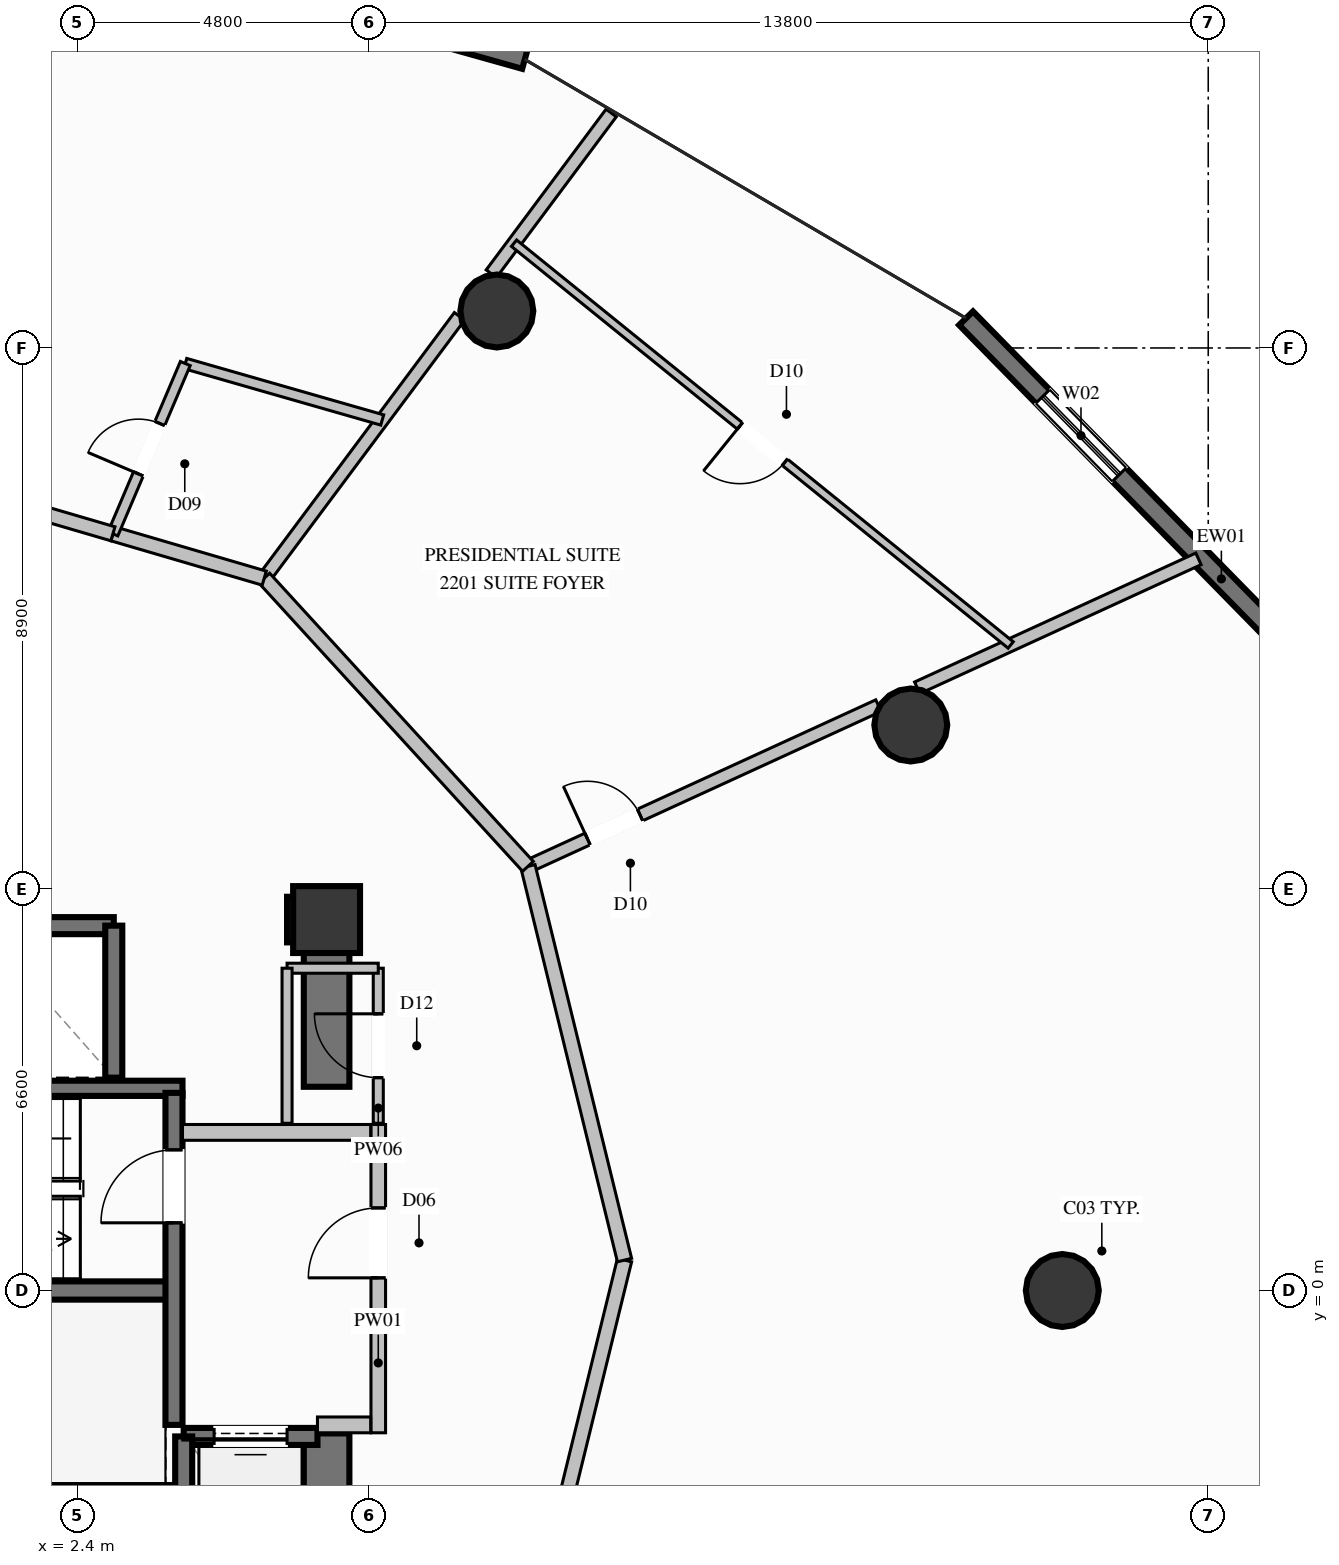
"""IFC4 building model, lengths in metres.
Left out: names, types, materials, properties, quantities, classifications, styles, units other than length and angle.
Written with IfcOpenShell. Run it as: python <this file> out.ifc"""

import sys

from ifc_helpers import new_model, si_unit, direction, frame, frame_2d, origin, origin_2d, place, context, subcontext, project, spatial, rectangle, circle, extrude, element, fill, save


model = new_model("IFC4")
c1 = context("Model", 3, precision=1e-05, world=origin(), true_north=direction((0.0, 1.0)))
c2 = subcontext(c1, "Body", "Model", "MODEL_VIEW")
j1 = project(units=[si_unit("LENGTHUNIT", "METRE"), si_unit("PLANEANGLEUNIT", "RADIAN")], contexts=[c1])
p1 = place(None, origin())
s1 = spatial("IfcSite", under=j1, at=p1, CompositionType="ELEMENT")
p2 = place(p1, origin())
s2 = spatial("IfcBuilding", under=s1, at=p2, CompositionType="ELEMENT")
p3 = place(p2, frame((0.0, 0.0, 82.4)))
s3 = spatial("IfcBuildingStorey", under=s2, at=p3, CompositionType="ELEMENT", Elevation=82.4)
p4 = place(p3, frame((6.5, 6.1, 0.0), z_axis=(0.0, 0.0, 1.0), x_axis=(1.0, 0.0, 0.0)))
e1 = element("IfcColumn", 1, at=p4, inside=s3, PredefinedType="COLUMN", context=c2, shape_type="SweptSolid", body=[
    extrude(rectangle(XDim=1.1, YDim=1.1, at=origin_2d()), origin(), (0.0, 0.0, 1.0), 3.6),
])
p5 = place(p3, frame((-3.99, 0.0, 0.0), z_axis=(0.0, 0.0, 1.0), x_axis=(1.0, 0.0, 0.0)))
e2 = element("IfcWall", 2, at=p5, inside=s3, PredefinedType="SHEAR", context=c2, shape_type="SweptSolid", body=[
    extrude(rectangle(XDim=7.98, YDim=0.3, at=frame_2d((3.99, 0.0))), origin(), (0.0, 0.0, 1.0), 3.6),
])
for number, where, z_axis, x_axis in (
    (3, (-4.13, -3.325, 0.0), (0.0, 0.0, 1.0), (1.0, 0.0, 0.0)),
    (4, (-4.13, 3.325, 0.0), (0.0, 0.0, 1.0), (1.0, 0.0, 0.0)),
):
    element("IfcWall", number, at=place(p3, frame(where, z_axis=z_axis, x_axis=x_axis)), inside=s3, PredefinedType="SOLIDWALL", context=c2, shape_type="SweptSolid", body=[
        extrude(rectangle(XDim=8.26, YDim=0.25, at=frame_2d((4.13, 0.0))), origin(), (0.0, 0.0, 1.0), 3.6),
    ])
p6 = place(p3, frame((5.85, 6.1, 0.0), z_axis=(0.0, 0.0, 1.0), x_axis=(1.0, 0.0, 0.0)))
e5 = element("IfcWall", 5, at=p6, inside=s3, PredefinedType="SHEAR", context=c2, shape_type="SweptSolid", body=[
    extrude(rectangle(XDim=0.275, YDim=0.75, at=frame_2d((0.137, 0.0))), origin(), (0.0, 0.0, 1.0), 3.6),
])
p7 = place(p3, frame((6.5, -6.475, 0.0), z_axis=(0.0, 0.0, 1.0), x_axis=(0.0, 1.0, 0.0)))
e6 = element("IfcWall", 6, at=p7, inside=s3, PredefinedType="SHEAR", context=c2, shape_type="SweptSolid", body=[
    extrude(rectangle(XDim=4.125, YDim=0.75, at=frame_2d((2.062, 0.0))), origin(), (0.0, 0.0, 1.0), 3.6),
])
p8 = place(p3, frame((6.5, 3.35, 0.0), z_axis=(0.0, 0.0, 1.0), x_axis=(0.0, 1.0, 0.0)))
e7 = element("IfcWall", 7, at=p8, inside=s3, PredefinedType="SHEAR", context=c2, shape_type="SweptSolid", body=[
    extrude(rectangle(XDim=3.125, YDim=0.75, at=frame_2d((1.562, 0.0))), origin(), (0.0, 0.0, 1.0), 3.6),
])
for number, where, z_axis, x_axis in (
    (8, (18.6, 0.0, 0.0), (0.0, 0.0, 1.0), (1.0, 0.0, 0.0)),
    (9, (16.108, 9.3, 0.0), (0.0, 0.0, 1.0), (1.0, 0.0, 0.0)),
    (10, (9.3, 16.108, 0.0), (0.0, 0.0, 1.0), (1.0, 0.0, 0.0)),
):
    element("IfcColumn", number, at=place(p3, frame(where, z_axis=z_axis, x_axis=x_axis)), inside=s3, PredefinedType="COLUMN", context=c2, shape_type="SweptSolid", body=[
        extrude(circle(Radius=0.6, at=origin_2d()), origin(), (0.0, 0.0, 1.0), 3.6),
    ])
p9 = place(p3, frame((17.017, 15.989, 0.0), z_axis=(0.0, 0.0, 1.0), x_axis=(0.699759555634, -0.714378446132, 0.0)))
e11 = element("IfcWall", 11, at=p9, inside=s3, PredefinedType="SOLIDWALL", context=c2, shape_type="SweptSolid", body=[
    extrude(rectangle(XDim=8.15, YDim=0.32, at=frame_2d((4.075, 0.0))), origin(), (0.0, 0.0, 1.0), 3.34),
])
p10 = place(p9, frame((1.801, 0.0, 0.35)))
e12 = element("IfcOpeningElement", 12, at=p10, cuts=e11, PredefinedType="OPENING", context=c2, shape_type="SweptSolid", body=[
    extrude(rectangle(XDim=1.8, YDim=2.6, at=frame_2d((0.9, 1.3))), frame((0.0, 0.17, 0.0), z_axis=(0.0, -1.0, 0.0), x_axis=(1.0, 0.0, 0.0)), (0.0, 0.0, 1.0), 0.34),
])
p11 = place(p3, frame((1.661, 22.52, 0.0), z_axis=(0.0, 0.0, 1.0), x_axis=(0.962743068747, -0.270417794495, 0.0)))
e13 = element("IfcWall", 13, at=p11, inside=s3, PredefinedType="SOLIDWALL", context=c2, shape_type="SweptSolid", body=[
    extrude(rectangle(XDim=8.413, YDim=0.32, at=frame_2d((4.206, 0.0))), origin(), (0.0, 0.0, 1.0), 3.34),
])
p12 = place(p11, frame((3.306, 0.0, 0.35)))
e14 = element("IfcOpeningElement", 14, at=p12, cuts=e13, PredefinedType="OPENING", context=c2, shape_type="SweptSolid", body=[
    extrude(rectangle(XDim=1.8, YDim=2.6, at=frame_2d((0.9, 1.3))), frame((0.0, 0.17, 0.0), z_axis=(0.0, -1.0, 0.0), x_axis=(1.0, 0.0, 0.0)), (0.0, 0.0, 1.0), 0.34),
])
p13 = place(p3, frame((3.0, 6.0, 0.0), z_axis=(0.0, 0.0, 1.0), x_axis=(-1.0, 0.0, 0.0)))
e15 = element("IfcWall", 15, at=p13, inside=s3, PredefinedType="SOLIDWALL", context=c2, shape_type="SweptSolid", body=[
    extrude(rectangle(XDim=2.2, YDim=0.28, at=frame_2d((1.1, 0.0))), origin(), (0.0, 0.0, 1.0), 3.34),
])
p14 = place(p3, frame((3.0, 3.5, 0.0), z_axis=(0.0, 0.0, 1.0), x_axis=(0.0, 1.0, 0.0)))
e16 = element("IfcWall", 16, at=p14, inside=s3, PredefinedType="SOLIDWALL", context=c2, shape_type="SweptSolid", body=[
    extrude(rectangle(XDim=2.5, YDim=0.28, at=frame_2d((1.25, 0.0))), origin(), (0.0, 0.0, 1.0), 3.34),
])
p15 = place(p3, frame((6.35, -2.4, 0.0), z_axis=(0.0, 0.0, 1.0), x_axis=(-1.0, 0.0, 0.0)))
e17 = element("IfcWall", 17, at=p15, inside=s3, PredefinedType="SOLIDWALL", context=c2, shape_type="SweptSolid", body=[
    extrude(rectangle(XDim=2.2, YDim=0.28, at=frame_2d((1.1, 0.0))), origin(), (0.0, 0.0, 1.0), 3.34),
])
p16 = place(p15, frame((0.5, 0.0, 0.0)))
e18 = element("IfcOpeningElement", 18, at=p16, cuts=e17, PredefinedType="OPENING", context=c2, shape_type="SweptSolid", body=[
    extrude(rectangle(XDim=1.2, YDim=2.2, at=frame_2d((0.6, 1.1))), frame((0.0, 0.15, 0.0), z_axis=(0.0, -1.0, 0.0), x_axis=(1.0, 0.0, 0.0)), (0.0, 0.0, 1.0), 0.3),
])
p17 = place(p3, frame((4.15, -2.4, 0.0), z_axis=(0.0, 0.0, 1.0), x_axis=(0.0, -1.0, 0.0)))
e19 = element("IfcWall", 19, at=p17, inside=s3, PredefinedType="SOLIDWALL", context=c2, shape_type="SweptSolid", body=[
    extrude(rectangle(XDim=2.7, YDim=0.28, at=frame_2d((1.35, 0.0))), origin(), (0.0, 0.0, 1.0), 3.34),
])
p18 = place(p3, frame((3.99, -2.21, 0.0), z_axis=(0.0, 0.0, 1.0), x_axis=(0.0, 1.0, 0.0)))
e20 = element("IfcWall", 20, at=p18, inside=s3, PredefinedType="SOLIDWALL", context=c2, shape_type="SweptSolid", body=[
    extrude(rectangle(XDim=5.46, YDim=0.28, at=frame_2d((2.73, 0.0))), origin(), (0.0, 0.0, 1.0), 3.34),
])
p19 = place(p18, frame((3.323, 0.0, 0.0)))
e21 = element("IfcOpeningElement", 21, at=p19, cuts=e20, PredefinedType="OPENING", context=c2, shape_type="SweptSolid", body=[
    extrude(rectangle(XDim=1.2, YDim=2.2, at=frame_2d((0.6, 1.1))), frame((0.0, 0.15, 0.0), z_axis=(0.0, -1.0, 0.0), x_axis=(1.0, 0.0, 0.0)), (0.0, 0.0, 1.0), 0.3),
])
p20 = place(p3, frame((7.35, -2.34, 0.0), z_axis=(0.0, 0.0, 1.0), x_axis=(0.0, 1.0, 0.0)))
e22 = element("IfcWall", 22, at=p20, inside=s3, PredefinedType="PARTITIONING", context=c2, shape_type="SweptSolid", body=[
    extrude(rectangle(XDim=5.07, YDim=0.24, at=frame_2d((2.535, 0.0))), origin(), (0.0, 0.0, 1.0), 2.425),
])
p21 = place(p20, frame((2.548, 0.0, 0.0)))
e23 = element("IfcOpeningElement", 23, at=p21, cuts=e22, PredefinedType="OPENING", context=c2, shape_type="SweptSolid", body=[
    extrude(rectangle(XDim=1.15, YDim=2.2, at=frame_2d((0.575, 1.1))), frame((0.0, 0.13, 0.0), z_axis=(0.0, -1.0, 0.0), x_axis=(1.0, 0.0, 0.0)), (0.0, 0.0, 1.0), 0.26),
])
p22 = place(p3, frame((6.35, -2.21, 0.0), z_axis=(0.0, 0.0, 1.0), x_axis=(1.0, 0.0, 0.0)))
e24 = element("IfcWall", 24, at=p22, inside=s3, PredefinedType="PARTITIONING", context=c2, shape_type="SweptSolid", body=[
    extrude(rectangle(XDim=0.875, YDim=0.26, at=frame_2d((0.438, 0.0))), origin(), (0.0, 0.0, 1.0), 3.34),
])
p23 = place(p3, frame((4.13, 2.6, 0.0), z_axis=(0.0, 0.0, 1.0), x_axis=(1.0, 0.0, 0.0)))
e25 = element("IfcWall", 25, at=p23, inside=s3, PredefinedType="PARTITIONING", context=c2, shape_type="SweptSolid", body=[
    extrude(rectangle(XDim=3.095, YDim=0.26, at=frame_2d((1.548, 0.0))), origin(), (0.0, 0.0, 1.0), 3.34),
])
p24 = place(p3, frame((7.35, 2.75, 0.0), z_axis=(0.0, 0.0, 1.0), x_axis=(0.0, 1.0, 0.0)))
e26 = element("IfcWall", 26, at=p24, inside=s3, PredefinedType="PARTITIONING", context=c2, shape_type="SweptSolid", body=[
    extrude(rectangle(XDim=2.55, YDim=0.165, at=frame_2d((1.275, 0.0))), origin(), (0.0, 0.0, 1.0), 3.34),
])
p25 = place(p24, frame((0.75, 0.0, 0.0)))
e27 = element("IfcOpeningElement", 27, at=p25, cuts=e26, PredefinedType="OPENING", context=c2, shape_type="SweptSolid", body=[
    extrude(rectangle(XDim=1.05, YDim=2.15, at=frame_2d((0.525, 1.075))), frame((0.0, 0.093, 0.0), z_axis=(0.0, -1.0, 0.0), x_axis=(1.0, 0.0, 0.0)), (0.0, 0.0, 1.0), 0.185),
])
p26 = place(p3, frame((7.35, 5.3, 0.0), z_axis=(0.0, 0.0, 1.0), x_axis=(-1.0, 0.0, 0.0)))
e28 = element("IfcWall", 28, at=p26, inside=s3, PredefinedType="PARTITIONING", context=c2, shape_type="SweptSolid", body=[
    extrude(rectangle(XDim=1.5, YDim=0.165, at=frame_2d((0.75, 0.0))), origin(), (0.0, 0.0, 1.0), 2.425),
])
p27 = place(p3, frame((5.85, 5.3, 0.0), z_axis=(0.0, 0.0, 1.0), x_axis=(0.0, -1.0, 0.0)))
e29 = element("IfcWall", 29, at=p27, inside=s3, PredefinedType="PARTITIONING", context=c2, shape_type="SweptSolid", body=[
    extrude(rectangle(XDim=2.55, YDim=0.165, at=frame_2d((1.275, 0.0))), origin(), (0.0, 0.0, 1.0), 2.425),
])
p28 = place(p3, frame((9.812, 6.975, 0.0), z_axis=(0.0, 0.0, 1.0), x_axis=(0.909003441182, 0.416788608192, 0.0)))
e30 = element("IfcWall", 30, at=p28, inside=s3, PredefinedType="PARTITIONING", context=c2, shape_type="SweptSolid", body=[
    extrude(rectangle(XDim=6.341, YDim=0.21, at=frame_2d((3.17, 0.0))), origin(), (0.0, 0.0, 1.0), 2.709),
])
p29 = place(p28, frame((1.078, 0.0, 0.0)))
e31 = element("IfcOpeningElement", 31, at=p29, cuts=e30, PredefinedType="OPENING", context=c2, shape_type="SweptSolid", body=[
    extrude(rectangle(XDim=0.95, YDim=2.1, at=frame_2d((0.475, 1.05))), frame((0.0, 0.115, 0.0), z_axis=(0.0, -1.0, 0.0), x_axis=(1.0, 0.0, 0.0)), (0.0, 0.0, 1.0), 0.23),
])
p30 = place(p3, frame((16.214, 9.911, 0.0), z_axis=(0.0, 0.0, 1.0), x_axis=(0.90896787086, 0.416866177261, 0.0)))
e32 = element("IfcWall", 32, at=p30, inside=s3, PredefinedType="PARTITIONING", context=c2, shape_type="SweptSolid", body=[
    extrude(rectangle(XDim=5.088, YDim=0.21, at=frame_2d((2.544, 0.0))), origin(), (0.0, 0.0, 1.0), 3.34),
])
p31 = place(p3, frame((5.475, 11.715, 0.0), z_axis=(0.0, 0.0, 1.0), x_axis=(0.597881312894, 0.801584640379, 0.0)))
e33 = element("IfcWall", 33, at=p31, inside=s3, PredefinedType="PARTITIONING", context=c2, shape_type="SweptSolid", body=[
    extrude(rectangle(XDim=5.371, YDim=0.21, at=frame_2d((2.685, 0.0))), origin(), (0.0, 0.0, 1.0), 2.709),
])
p32 = place(p3, frame((9.209, 16.721, 0.0), z_axis=(0.0, 0.0, 1.0), x_axis=(0.597842421617, 0.801613646912, 0.0)))
e34 = element("IfcWall", 34, at=p32, inside=s3, PredefinedType="PARTITIONING", context=c2, shape_type="SweptSolid", body=[
    extrude(rectangle(XDim=3.298, YDim=0.21, at=frame_2d((1.649, 0.0))), origin(), (0.0, 0.0, 1.0), 3.34),
])
for number, where, z_axis, x_axis in (
    (35, (9.812, -5.975, 0.0), (0.0, 0.0, 1.0), (0.238, 0.971, 0.0)),
    (36, (11.4, 0.5, 0.0), (0.0, 0.0, 1.0), (-0.238, 0.971, 0.0)),
):
    element("IfcWall", number, at=place(p3, frame(where, z_axis=z_axis, x_axis=x_axis)), inside=s3, PredefinedType="PARTITIONING", context=c2, shape_type="SweptSolid", body=[
        extrude(rectangle(XDim=6.667, YDim=0.24, at=frame_2d((3.333, 0.0))), origin(), (0.0, 0.0, 1.0), 3.34),
    ])
p33 = place(p3, frame((9.812, 6.975, 0.0), z_axis=(0.0, 0.0, 1.0), x_axis=(-0.675041189424, 0.737780043496, 0.0)))
e37 = element("IfcWall", 37, at=p33, inside=s3, PredefinedType="PARTITIONING", context=c2, shape_type="SweptSolid", body=[
    extrude(rectangle(XDim=6.425, YDim=0.24, at=frame_2d((3.212, 0.0))), origin(), (0.0, 0.0, 1.0), 3.34),
])
p34 = place(p3, frame((17.751, 10.616, 0.0), z_axis=(0.0, 0.0, 1.0), x_axis=(-0.77748834584, 0.62889734622, 0.0)))
e38 = element("IfcWall", 38, at=p34, inside=s3, PredefinedType="PARTITIONING", context=c2, shape_type="SweptSolid", body=[
    extrude(rectangle(XDim=10.506, YDim=0.135, at=frame_2d((5.253, 0.0))), origin(), (0.0, 0.0, 1.0), 3.34),
])
p35 = place(p34, frame((4.778, 0.0, 0.0)))
e39 = element("IfcOpeningElement", 39, at=p35, cuts=e38, PredefinedType="OPENING", context=c2, shape_type="SweptSolid", body=[
    extrude(rectangle(XDim=0.95, YDim=2.1, at=frame_2d((0.475, 1.05))), frame((0.0, 0.078, 0.0), z_axis=(0.0, -1.0, 0.0), x_axis=(1.0, 0.0, 0.0)), (0.0, 0.0, 1.0), 0.155),
])
p36 = place(p3, frame((5.475, 11.715, 0.0), z_axis=(0.0, 0.0, 1.0), x_axis=(-0.959684159597, 0.281080618005, 0.0)))
e40 = element("IfcWall", 40, at=p36, inside=s3, PredefinedType="PARTITIONING", context=c2, shape_type="SweptSolid", body=[
    extrude(rectangle(XDim=2.594, YDim=0.24, at=frame_2d((1.297, 0.0))), origin(), (0.0, 0.0, 1.0), 3.34),
])
p37 = place(p3, frame((7.415, 14.316, 0.0), z_axis=(0.0, 0.0, 1.0), x_axis=(-0.961324087614, 0.275419677171, 0.0)))
e41 = element("IfcWall", 41, at=p37, inside=s3, PredefinedType="PLUMBINGWALL", context=c2, shape_type="SweptSolid", body=[
    extrude(rectangle(XDim=3.369, YDim=0.175, at=frame_2d((1.685, 0.0))), origin(), (0.0, 0.0, 1.0), 3.34),
])
p38 = place(p3, frame((2.986, 12.444, 0.0), z_axis=(0.0, 0.0, 1.0), x_axis=(0.391147437737, 0.920328029537, 0.0)))
e42 = element("IfcWall", 42, at=p38, inside=s3, PredefinedType="PLUMBINGWALL", context=c2, shape_type="SweptSolid", body=[
    extrude(rectangle(XDim=3.042, YDim=0.175, at=frame_2d((1.521, 0.0))), origin(), (0.0, 0.0, 1.0), 3.34),
])
p39 = place(p38, frame((1.071, 0.0, 0.0)))
e43 = element("IfcOpeningElement", 43, at=p39, cuts=e42, PredefinedType="OPENING", context=c2, shape_type="SweptSolid", body=[
    extrude(rectangle(XDim=0.9, YDim=2.1, at=frame_2d((0.45, 1.05))), frame((0.0, 0.098, 0.0), z_axis=(0.0, -1.0, 0.0), x_axis=(1.0, 0.0, 0.0)), (0.0, 0.0, 1.0), 0.195),
])
p40 = place(p3, frame((2.986, 12.444, 0.0), z_axis=(0.0, 0.0, 1.0), x_axis=(-0.959723057579, 0.280947775844, 0.0)))
e44 = element("IfcWall", 44, at=p40, inside=s3, PredefinedType="PARTITIONING", context=c2, shape_type="SweptSolid", body=[
    extrude(rectangle(XDim=3.58, YDim=0.24, at=frame_2d((1.79, 0.0))), origin(), (0.0, 0.0, 1.0), 3.34),
])
p41 = place(p40, frame((1.24, 0.0, 0.0)))
e45 = element("IfcOpeningElement", 45, at=p41, cuts=e44, PredefinedType="OPENING", context=c2, shape_type="SweptSolid", body=[
    extrude(rectangle(XDim=1.1, YDim=2.3, at=frame_2d((0.55, 1.15))), frame((0.0, 0.13, 0.0), z_axis=(0.0, -1.0, 0.0), x_axis=(1.0, 0.0, 0.0)), (0.0, 0.0, 1.0), 0.26),
])
p42 = place(p10, origin())
e46 = element("IfcWindow", 46, at=p42, inside=s3, PartitioningType="SINGLE_PANEL", PredefinedType="WINDOW", context=c2, shape_type="SweptSolid", body=[
    extrude(rectangle(XDim=1.8, YDim=2.6, at=frame_2d((0.9, 1.3))), frame((0.0, 0.03, 0.0), z_axis=(0.0, -1.0, 0.0), x_axis=(1.0, 0.0, 0.0)), (0.0, 0.0, 1.0), 0.06),
])
fill(e12, e46)
p43 = place(p16, origin())
e47 = element("IfcDoor", 47, at=p43, inside=s3, OperationType="SLIDING_TO_LEFT", PredefinedType="DOOR", context=c2, shape_type="SweptSolid", body=[
    extrude(rectangle(XDim=1.2, YDim=2.2, at=frame_2d((0.6, 1.1))), frame((0.0, 0.025, 0.0), z_axis=(0.0, -1.0, 0.0), x_axis=(1.0, 0.0, 0.0)), (0.0, 0.0, 1.0), 0.05),
])
fill(e18, e47)
p44 = place(p19, origin())
e48 = element("IfcDoor", 48, at=p44, inside=s3, OperationType="SINGLE_SWING_LEFT", PredefinedType="DOOR", context=c2, shape_type="SweptSolid", body=[
    extrude(rectangle(XDim=1.2, YDim=2.2, at=frame_2d((0.6, 1.1))), frame((0.0, 0.025, 0.0), z_axis=(0.0, -1.0, 0.0), x_axis=(1.0, 0.0, 0.0)), (0.0, 0.0, 1.0), 0.05),
])
fill(e21, e48)
p45 = place(p21, origin())
e49 = element("IfcDoor", 49, at=p45, inside=s3, OperationType="SINGLE_SWING_LEFT", PredefinedType="DOOR", context=c2, shape_type="SweptSolid", body=[
    extrude(rectangle(XDim=1.15, YDim=2.2, at=frame_2d((0.575, 1.1))), frame((0.0, 0.025, 0.0), z_axis=(0.0, -1.0, 0.0), x_axis=(1.0, 0.0, 0.0)), (0.0, 0.0, 1.0), 0.05),
])
fill(e23, e49)
p46 = place(p25, origin())
e50 = element("IfcDoor", 50, at=p46, inside=s3, OperationType="SINGLE_SWING_RIGHT", PredefinedType="DOOR", context=c2, shape_type="SweptSolid", body=[
    extrude(rectangle(XDim=1.05, YDim=2.15, at=frame_2d((0.525, 1.075))), frame((0.0, 0.025, 0.0), z_axis=(0.0, -1.0, 0.0), x_axis=(1.0, 0.0, 0.0)), (0.0, 0.0, 1.0), 0.05),
])
fill(e27, e50)
p47 = place(p29, origin())
e51 = element("IfcDoor", 51, at=p47, inside=s3, OperationType="SINGLE_SWING_LEFT", PredefinedType="DOOR", context=c2, shape_type="SweptSolid", body=[
    extrude(rectangle(XDim=0.95, YDim=2.1, at=frame_2d((0.475, 1.05))), frame((0.0, 0.025, 0.0), z_axis=(0.0, -1.0, 0.0), x_axis=(1.0, 0.0, 0.0)), (0.0, 0.0, 1.0), 0.05),
])
fill(e31, e51)
p48 = place(p35, origin())
e52 = element("IfcDoor", 52, at=p48, inside=s3, OperationType="SINGLE_SWING_RIGHT", PredefinedType="DOOR", context=c2, shape_type="SweptSolid", body=[
    extrude(rectangle(XDim=0.95, YDim=2.1, at=frame_2d((0.475, 1.05))), frame((0.0, 0.025, 0.0), z_axis=(0.0, -1.0, 0.0), x_axis=(1.0, 0.0, 0.0)), (0.0, 0.0, 1.0), 0.05),
])
fill(e39, e52)
p49 = place(p39, origin())
e53 = element("IfcDoor", 53, at=p49, inside=s3, OperationType="SINGLE_SWING_LEFT", PredefinedType="DOOR", context=c2, shape_type="SweptSolid", body=[
    extrude(rectangle(XDim=0.9, YDim=2.1, at=frame_2d((0.45, 1.05))), frame((0.0, 0.025, 0.0), z_axis=(0.0, -1.0, 0.0), x_axis=(1.0, 0.0, 0.0)), (0.0, 0.0, 1.0), 0.05),
])
fill(e43, e53)
save(model, sys.argv[1])
